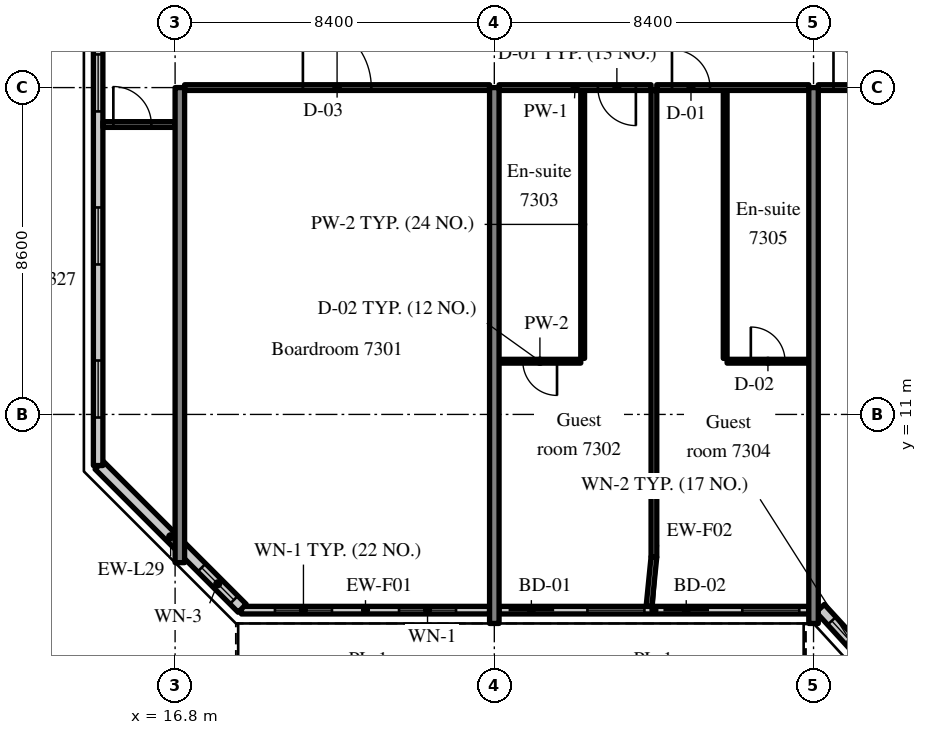
"""IFC4 building model, lengths in metres.
Left out: names, types, materials, properties, quantities, classifications, styles, units other than length and angle.
Written with IfcOpenShell. Run it as: python <this file> out.ifc"""

import sys

from ifc_helpers import new_model, si_unit, direction, frame, frame_2d, origin, place, context, subcontext, project, spatial, rectangle, extrude, source, transform, mapped, element, fill, save


model = new_model("IFC4")
c1 = context("Model", 3, precision=1e-05, world=origin(), true_north=direction((0.0, 1.0)))
c2 = subcontext(c1, "Body", "Model", "MODEL_VIEW")
j1 = project(units=[si_unit("LENGTHUNIT", "METRE"), si_unit("PLANEANGLEUNIT", "RADIAN")], contexts=[c1])
p1 = place(None, origin())
s1 = spatial("IfcSite", under=j1, at=p1, CompositionType="ELEMENT")
p2 = place(p1, origin())
s2 = spatial("IfcBuilding", under=s1, at=p2, CompositionType="ELEMENT")
p3 = place(p2, frame((0.0, 0.0, 305.7)))
s3 = spatial("IfcBuildingStorey", under=s2, at=p3, CompositionType="ELEMENT", Elevation=305.7)
m1 = source(origin(), c2, "Body", "SweptSolid", [
    extrude(rectangle(XDim=12.5, YDim=0.25, at=frame_2d((6.25, 0.0))), origin(), (0.0, 0.0, 1.0), 3.72),
])
p4 = place(p3, frame((16.925, 7.1, 0.0), z_axis=(0.0, 0.0, 1.0), x_axis=(0.0, 1.0, 0.0)))
e1 = element("IfcWall", 1, at=p4, inside=s3, PredefinedType="SHEAR", context=c2, shape_type="MappedRepresentation", body=[
    mapped(m1, transform((0.0, 0.0, 0.0), scale=1.0)),
])
m2 = source(origin(), c2, "Body", "SweptSolid", [
    extrude(rectangle(XDim=14.1, YDim=0.25, at=frame_2d((7.05, 0.0))), origin(), (0.0, 0.0, 1.0), 3.72),
])
for number, where, z_axis, x_axis in (
    (2, (25.2, 5.5, 0.0), (0.0, 0.0, 1.0), (0.0, 1.0, 0.0)),
    (3, (33.6, 5.5, 0.0), (0.0, 0.0, 1.0), (0.0, 1.0, 0.0)),
):
    element("IfcWall", number, at=place(p3, frame(where, z_axis=z_axis, x_axis=x_axis)), inside=s3, PredefinedType="SHEAR", context=c2, shape_type="MappedRepresentation", body=[
        mapped(m2, transform((0.0, 0.0, 0.0), scale=1.0)),
    ])
m3 = source(origin(), c2, "Body", "SweptSolid", [
    extrude(rectangle(XDim=6.53, YDim=0.2, at=frame_2d((3.265, 0.0))), origin(), (0.0, 0.0, 1.0), 3.17),
])
p5 = place(p3, frame((18.545, 5.85, 0.0), z_axis=(0.0, 0.0, 1.0), x_axis=(1.0, 0.0, 0.0)))
e4 = element("IfcWall", 4, at=p5, inside=s3, PredefinedType="SOLIDWALL", context=c2, shape_type="MappedRepresentation", body=[
    mapped(m3, transform((0.0, 0.0, 0.0), scale=1.0)),
])
m4 = source(origin(), c2, "Body", "SweptSolid", [
    extrude(rectangle(XDim=1.5, YDim=1.5, at=frame_2d((0.75, 0.75))), frame((0.0, 0.11, 0.0), z_axis=(0.0, -1.0, 0.0), x_axis=(1.0, 0.0, 0.0)), (0.0, 0.0, 1.0), 0.22),
])
p6 = place(p5, frame((0.883, 0.0, 0.9)))
e5 = element("IfcOpeningElement", 5, at=p6, cuts=e4, PredefinedType="OPENING", context=c2, shape_type="MappedRepresentation", body=[
    mapped(m4, transform((0.0, 0.0, 0.0), scale=1.0)),
])
p7 = place(p5, frame((4.147, 0.0, 0.9)))
e6 = element("IfcOpeningElement", 6, at=p7, cuts=e4, PredefinedType="OPENING", context=c2, shape_type="MappedRepresentation", body=[
    mapped(m4, transform((0.0, 0.0, 0.0), scale=1.0)),
])
m5 = source(origin(), c2, "Body", "SweptSolid", [
    extrude(rectangle(XDim=8.15, YDim=0.2, at=frame_2d((4.075, 0.0))), origin(), (0.0, 0.0, 1.0), 3.17),
])
p8 = place(p3, frame((25.325, 5.85, 0.0), z_axis=(0.0, 0.0, 1.0), x_axis=(1.0, 0.0, 0.0)))
e7 = element("IfcWall", 7, at=p8, inside=s3, PredefinedType="SOLIDWALL", context=c2, shape_type="MappedRepresentation", body=[
    mapped(m5, transform((0.0, 0.0, 0.0), scale=1.0)),
])
m6 = source(origin(), c2, "Body", "SweptSolid", [
    extrude(rectangle(XDim=1.2, YDim=2.4, at=frame_2d((0.6, 1.2))), frame((0.0, 0.11, 0.0), z_axis=(0.0, -1.0, 0.0), x_axis=(1.0, 0.0, 0.0)), (0.0, 0.0, 1.0), 0.22),
])
p9 = place(p8, frame((0.25, 0.0, 0.0)))
e8 = element("IfcOpeningElement", 8, at=p9, cuts=e7, PredefinedType="OPENING", context=c2, shape_type="MappedRepresentation", body=[
    mapped(m6, transform((0.0, 0.0, 0.0), scale=1.0)),
])
p10 = place(p8, frame((2.325, 0.0, 0.9)))
e9 = element("IfcOpeningElement", 9, at=p10, cuts=e7, PredefinedType="OPENING", context=c2, shape_type="MappedRepresentation", body=[
    mapped(m4, transform((0.0, 0.0, 0.0), scale=1.0)),
])
p11 = place(p8, frame((4.325, 0.0, 0.0)))
e10 = element("IfcOpeningElement", 10, at=p11, cuts=e7, PredefinedType="OPENING", context=c2, shape_type="MappedRepresentation", body=[
    mapped(m6, transform((0.0, 0.0, 0.0), scale=1.0)),
])
p12 = place(p8, frame((6.4, 0.0, 0.9)))
e11 = element("IfcOpeningElement", 11, at=p12, cuts=e7, PredefinedType="OPENING", context=c2, shape_type="MappedRepresentation", body=[
    mapped(m4, transform((0.0, 0.0, 0.0), scale=1.0)),
])
m7 = source(origin(), c2, "Body", "SweptSolid", [
    extrude(rectangle(XDim=2.398, YDim=0.3, at=frame_2d((1.199, 0.0))), origin(), (0.0, 0.0, 1.0), 3.72),
])
p13 = place(p3, frame((33.776, 5.9, 0.0), z_axis=(0.0, 0.0, 1.0), x_axis=(0.675374189419, -0.737475222815, 0.0)))
e12 = element("IfcWall", 12, at=p13, inside=s3, PredefinedType="SOLIDWALL", context=c2, shape_type="MappedRepresentation", body=[
    mapped(m7, transform((0.0, 0.0, 0.0), scale=1.0)),
])
m8 = source(origin(), c2, "Body", "SweptSolid", [
    extrude(rectangle(XDim=1.5, YDim=2.0, at=frame_2d((0.75, 1.0))), frame((0.0, 0.16, 0.0), z_axis=(0.0, -1.0, 0.0), x_axis=(1.0, 0.0, 0.0)), (0.0, 0.0, 1.0), 0.32),
])
p14 = place(p13, frame((0.449, 0.0, 0.9)))
e13 = element("IfcOpeningElement", 13, at=p14, cuts=e12, PredefinedType="OPENING", context=c2, shape_type="MappedRepresentation", body=[
    mapped(m8, transform((0.0, 0.0, 0.0), scale=1.0)),
])
m9 = source(origin(), c2, "Body", "SweptSolid", [
    extrude(rectangle(XDim=5.326, YDim=0.3, at=frame_2d((2.663, 0.0))), origin(), (0.0, 0.0, 1.0), 3.72),
])
p15 = place(p3, frame((14.8, 9.666, 0.0), z_axis=(0.0, 0.0, 1.0), x_axis=(0.707083859269, -0.707129702361, 0.0)))
e14 = element("IfcWall", 14, at=p15, inside=s3, PredefinedType="SOLIDWALL", context=c2, shape_type="MappedRepresentation", body=[
    mapped(m9, transform((0.0, 0.0, 0.0), scale=1.0)),
])
m10 = source(origin(), c2, "Body", "SweptSolid", [
    extrude(rectangle(XDim=1.2, YDim=1.5, at=frame_2d((0.6, 0.75))), frame((0.0, 0.16, 0.0), z_axis=(0.0, -1.0, 0.0), x_axis=(1.0, 0.0, 0.0)), (0.0, 0.0, 1.0), 0.32),
])
p16 = place(p15, frame((3.815, 0.0, 0.9)))
e15 = element("IfcOpeningElement", 15, at=p16, cuts=e14, PredefinedType="OPENING", context=c2, shape_type="MappedRepresentation", body=[
    mapped(m10, transform((0.0, 0.0, 0.0), scale=1.0)),
])
m11 = source(origin(), c2, "Body", "SweptSolid", [
    extrude(rectangle(XDim=28.189, YDim=0.25, at=frame_2d((14.095, 0.0))), origin(), (0.0, 0.0, 1.0), 3.72),
])
p17 = place(p3, frame((14.775, 37.845, 0.0), z_axis=(0.0, 0.0, 1.0), x_axis=(0.0, -1.0, 0.0)))
e16 = element("IfcWall", 16, at=p17, inside=s3, PredefinedType="SOLIDWALL", context=c2, shape_type="MappedRepresentation", body=[
    mapped(m11, transform((0.0, 0.0, 0.0), scale=1.0)),
])
m12 = source(origin(), c2, "Body", "SweptSolid", [
    extrude(rectangle(XDim=1.5, YDim=1.5, at=frame_2d((0.75, 0.75))), frame((0.0, 0.135, 0.0), z_axis=(0.0, -1.0, 0.0), x_axis=(1.0, 0.0, 0.0)), (0.0, 0.0, 1.0), 0.27),
])
p18 = place(p17, frame((1.263, 0.0, 0.9)))
e17 = element("IfcOpeningElement", 17, at=p18, cuts=e16, PredefinedType="OPENING", context=c2, shape_type="MappedRepresentation", body=[
    mapped(m12, transform((0.0, 0.0, 0.0), scale=1.0)),
])
p19 = place(p17, frame((5.291, 0.0, 0.9)))
e18 = element("IfcOpeningElement", 18, at=p19, cuts=e16, PredefinedType="OPENING", context=c2, shape_type="MappedRepresentation", body=[
    mapped(m12, transform((0.0, 0.0, 0.0), scale=1.0)),
])
p20 = place(p17, frame((9.318, 0.0, 0.9)))
e19 = element("IfcOpeningElement", 19, at=p20, cuts=e16, PredefinedType="OPENING", context=c2, shape_type="MappedRepresentation", body=[
    mapped(m12, transform((0.0, 0.0, 0.0), scale=1.0)),
])
p21 = place(p17, frame((13.345, 0.0, 0.9)))
e20 = element("IfcOpeningElement", 20, at=p21, cuts=e16, PredefinedType="OPENING", context=c2, shape_type="MappedRepresentation", body=[
    mapped(m12, transform((0.0, 0.0, 0.0), scale=1.0)),
])
p22 = place(p17, frame((17.372, 0.0, 0.9)))
e21 = element("IfcOpeningElement", 21, at=p22, cuts=e16, PredefinedType="OPENING", context=c2, shape_type="MappedRepresentation", body=[
    mapped(m12, transform((0.0, 0.0, 0.0), scale=1.0)),
])
p23 = place(p17, frame((21.399, 0.0, 0.9)))
e22 = element("IfcOpeningElement", 22, at=p23, cuts=e16, PredefinedType="OPENING", context=c2, shape_type="MappedRepresentation", body=[
    mapped(m12, transform((0.0, 0.0, 0.0), scale=1.0)),
])
p24 = place(p17, frame((25.426, 0.0, 0.9)))
e23 = element("IfcOpeningElement", 23, at=p24, cuts=e16, PredefinedType="OPENING", context=c2, shape_type="MappedRepresentation", body=[
    mapped(m12, transform((0.0, 0.0, 0.0), scale=1.0)),
])
m13 = source(origin(), c2, "Body", "SweptSolid", [
    extrude(rectangle(XDim=8.025, YDim=0.15, at=frame_2d((4.012, 0.0))), origin(), (0.0, 0.0, 1.0), 3.02),
])
p25 = place(p3, frame((17.05, 19.6, 0.0), z_axis=(0.0, 0.0, 1.0), x_axis=(1.0, 0.0, 0.0)))
e24 = element("IfcWall", 24, at=p25, inside=s3, PredefinedType="PARTITIONING", context=c2, shape_type="MappedRepresentation", body=[
    mapped(m13, transform((0.0, 0.0, 0.0), scale=1.0)),
])
m14 = source(origin(), c2, "Body", "SweptSolid", [
    extrude(rectangle(XDim=1.8, YDim=2.1, at=frame_2d((0.9, 1.05))), frame((0.0, 0.085, 0.0), z_axis=(0.0, -1.0, 0.0), x_axis=(1.0, 0.0, 0.0)), (0.0, 0.0, 1.0), 0.17),
])
p26 = place(p25, frame((3.113, 0.0, 0.0)))
e25 = element("IfcOpeningElement", 25, at=p26, cuts=e24, PredefinedType="OPENING", context=c2, shape_type="MappedRepresentation", body=[
    mapped(m14, transform((0.0, 0.0, 0.0), scale=1.0)),
])
m15 = source(origin(), c2, "Body", "SweptSolid", [
    extrude(rectangle(XDim=7.05, YDim=0.1, at=frame_2d((3.525, 0.0))), origin(), (0.0, 0.0, 1.0), 3.72),
])
p27 = place(p3, frame((27.525, 12.475, 0.0), z_axis=(0.0, 0.0, 1.0), x_axis=(0.0, 1.0, 0.0)))
e26 = element("IfcWall", 26, at=p27, inside=s3, PredefinedType="PARTITIONING", context=c2, shape_type="MappedRepresentation", body=[
    mapped(m15, transform((0.0, 0.0, 0.0), scale=1.0)),
])
m16 = source(origin(), c2, "Body", "SweptSolid", [
    extrude(rectangle(XDim=2.15, YDim=0.1, at=frame_2d((1.075, 0.0))), origin(), (0.0, 0.0, 1.0), 3.72),
])
p28 = place(p3, frame((25.325, 12.4, 0.0), z_axis=(0.0, 0.0, 1.0), x_axis=(1.0, 0.0, 0.0)))
e27 = element("IfcWall", 27, at=p28, inside=s3, PredefinedType="PARTITIONING", context=c2, shape_type="MappedRepresentation", body=[
    mapped(m16, transform((0.0, 0.0, 0.0), scale=1.0)),
])
m17 = source(origin(), c2, "Body", "SweptSolid", [
    extrude(rectangle(XDim=0.9, YDim=2.1, at=frame_2d((0.45, 1.05))), frame((0.0, 0.06, 0.0), z_axis=(0.0, -1.0, 0.0), x_axis=(1.0, 0.0, 0.0)), (0.0, 0.0, 1.0), 0.12),
])
p29 = place(p28, frame((0.625, 0.0, 0.0)))
e28 = element("IfcOpeningElement", 28, at=p29, cuts=e27, PredefinedType="OPENING", context=c2, shape_type="MappedRepresentation", body=[
    mapped(m17, transform((0.0, 0.0, 0.0), scale=1.0)),
])
m18 = source(origin(), c2, "Body", "SweptSolid", [
    extrude(rectangle(XDim=4.0, YDim=0.15, at=frame_2d((2.0, 0.0))), origin(), (0.0, 0.0, 1.0), 3.02),
])
p30 = place(p3, frame((25.325, 19.6, 0.0), z_axis=(0.0, 0.0, 1.0), x_axis=(1.0, 0.0, 0.0)))
e29 = element("IfcWall", 29, at=p30, inside=s3, PredefinedType="PARTITIONING", context=c2, shape_type="MappedRepresentation", body=[
    mapped(m18, transform((0.0, 0.0, 0.0), scale=1.0)),
])
m19 = source(origin(), c2, "Body", "SweptSolid", [
    extrude(rectangle(XDim=1.0, YDim=2.1, at=frame_2d((0.5, 1.05))), frame((0.0, 0.085, 0.0), z_axis=(0.0, -1.0, 0.0), x_axis=(1.0, 0.0, 0.0)), (0.0, 0.0, 1.0), 0.17),
])
p31 = place(p30, frame((2.6, 0.0, 0.0)))
e30 = element("IfcOpeningElement", 30, at=p31, cuts=e29, PredefinedType="OPENING", context=c2, shape_type="MappedRepresentation", body=[
    mapped(m19, transform((0.0, 0.0, 0.0), scale=1.0)),
])
p32 = place(p3, frame((31.275, 12.475, 0.0), z_axis=(0.0, 0.0, 1.0), x_axis=(0.0, 1.0, 0.0)))
e31 = element("IfcWall", 31, at=p32, inside=s3, PredefinedType="PARTITIONING", context=c2, shape_type="MappedRepresentation", body=[
    mapped(m15, transform((0.0, 0.0, 0.0), scale=1.0)),
])
p33 = place(p3, frame((31.325, 12.4, 0.0), z_axis=(0.0, 0.0, 1.0), x_axis=(1.0, 0.0, 0.0)))
e32 = element("IfcWall", 32, at=p33, inside=s3, PredefinedType="PARTITIONING", context=c2, shape_type="MappedRepresentation", body=[
    mapped(m16, transform((0.0, 0.0, 0.0), scale=1.0)),
])
p34 = place(p33, frame((0.625, 0.0, 0.0)))
e33 = element("IfcOpeningElement", 33, at=p34, cuts=e32, PredefinedType="OPENING", context=c2, shape_type="MappedRepresentation", body=[
    mapped(m17, transform((0.0, 0.0, 0.0), scale=1.0)),
])
p35 = place(p3, frame((29.475, 19.6, 0.0), z_axis=(0.0, 0.0, 1.0), x_axis=(1.0, 0.0, 0.0)))
e34 = element("IfcWall", 34, at=p35, inside=s3, PredefinedType="PARTITIONING", context=c2, shape_type="MappedRepresentation", body=[
    mapped(m18, transform((0.0, 0.0, 0.0), scale=1.0)),
])
p36 = place(p35, frame((0.4, 0.0, 0.0)))
e35 = element("IfcOpeningElement", 35, at=p36, cuts=e34, PredefinedType="OPENING", context=c2, shape_type="MappedRepresentation", body=[
    mapped(m19, transform((0.0, 0.0, 0.0), scale=1.0)),
])
m20 = source(origin(), c2, "Body", "SweptSolid", [
    extrude(rectangle(XDim=12.275, YDim=0.15, at=frame_2d((6.137, 0.0))), origin(), (0.0, 0.0, 1.0), 3.72),
])
p37 = place(p3, frame((29.4, 7.25, 0.0), z_axis=(0.0, 0.0, 1.0), x_axis=(0.0, 1.0, 0.0)))
e36 = element("IfcWall", 36, at=p37, inside=s3, PredefinedType="PARTITIONING", context=c2, shape_type="MappedRepresentation", body=[
    mapped(m20, transform((0.0, 0.0, 0.0), scale=1.0)),
])
m21 = source(origin(), c2, "Body", "SweptSolid", [
    extrude(rectangle(XDim=8.15, YDim=0.15, at=frame_2d((4.075, 0.0))), origin(), (0.0, 0.0, 1.0), 3.02),
])
p38 = place(p3, frame((33.725, 19.6, 0.0), z_axis=(0.0, 0.0, 1.0), x_axis=(1.0, 0.0, 0.0)))
e37 = element("IfcWall", 37, at=p38, inside=s3, PredefinedType="PARTITIONING", context=c2, shape_type="MappedRepresentation", body=[
    mapped(m21, transform((0.0, 0.0, 0.0), scale=1.0)),
])
p39 = place(p38, frame((0.4, 0.0, 0.0)))
e38 = element("IfcOpeningElement", 38, at=p39, cuts=e37, PredefinedType="OPENING", context=c2, shape_type="MappedRepresentation", body=[
    mapped(m19, transform((0.0, 0.0, 0.0), scale=1.0)),
])
m22 = source(origin(), c2, "Body", "SweptSolid", [
    extrude(rectangle(XDim=1.9, YDim=0.15, at=frame_2d((0.95, 0.0))), origin(), (0.0, 0.0, 1.0), 3.02),
])
p40 = place(p3, frame((14.9, 18.628, 0.0), z_axis=(0.0, 0.0, 1.0), x_axis=(1.0, 0.0, 0.0)))
e39 = element("IfcWall", 39, at=p40, inside=s3, PredefinedType="PARTITIONING", context=c2, shape_type="MappedRepresentation", body=[
    mapped(m22, transform((0.0, 0.0, 0.0), scale=1.0)),
])
p41 = place(p40, frame((0.275, 0.0, 0.0)))
e40 = element("IfcOpeningElement", 40, at=p41, cuts=e39, PredefinedType="OPENING", context=c2, shape_type="MappedRepresentation", body=[
    mapped(m19, transform((0.0, 0.0, 0.0), scale=1.0)),
])
m23 = source(origin(), c2, "Body", "SweptSolid", [
    extrude(rectangle(XDim=1.307, YDim=0.15, at=frame_2d((0.653, 0.0))), origin(), (0.0, 0.0, 1.0), 3.72),
])
p42 = place(p3, frame((29.27, 5.95, 0.0), z_axis=(0.0, 0.0, 1.0), x_axis=(0.099411212066, 0.995046436562, 0.0)))
e41 = element("IfcWall", 41, at=p42, inside=s3, PredefinedType="PARTITIONING", context=c2, shape_type="MappedRepresentation", body=[
    mapped(m23, transform((0.0, 0.0, 0.0), scale=1.0)),
])
m24 = source(origin(), c2, "Body", "SweptSolid", [
    extrude(rectangle(XDim=1.5, YDim=1.5, at=frame_2d((0.75, 0.75))), frame((0.0, 0.03, 0.0), z_axis=(0.0, -1.0, 0.0), x_axis=(1.0, 0.0, 0.0)), (0.0, 0.0, 1.0), 0.06),
])
p43 = place(p6, origin())
e42 = element("IfcWindow", 42, at=p43, inside=s3, PartitioningType="SINGLE_PANEL", PredefinedType="WINDOW", context=c2, shape_type="MappedRepresentation", body=[
    mapped(m24, transform((0.0, 0.0, 0.0), scale=1.0)),
])
fill(e5, e42)
p44 = place(p7, origin())
e43 = element("IfcWindow", 43, at=p44, inside=s3, PartitioningType="SINGLE_PANEL", PredefinedType="WINDOW", context=c2, shape_type="MappedRepresentation", body=[
    mapped(m24, transform((0.0, 0.0, 0.0), scale=1.0)),
])
fill(e6, e43)
m25 = source(origin(), c2, "Body", "SweptSolid", [
    extrude(rectangle(XDim=1.2, YDim=2.4, at=frame_2d((0.6, 1.2))), frame((0.0, 0.025, 0.0), z_axis=(0.0, -1.0, 0.0), x_axis=(1.0, 0.0, 0.0)), (0.0, 0.0, 1.0), 0.05),
])
p45 = place(p9, origin())
e44 = element("IfcDoor", 44, at=p45, inside=s3, OperationType="SLIDING_TO_LEFT", PredefinedType="DOOR", context=c2, shape_type="MappedRepresentation", body=[
    mapped(m25, transform((0.0, 0.0, 0.0), scale=1.0)),
])
fill(e8, e44)
p46 = place(p10, origin())
e45 = element("IfcWindow", 45, at=p46, inside=s3, PartitioningType="SINGLE_PANEL", PredefinedType="WINDOW", context=c2, shape_type="MappedRepresentation", body=[
    mapped(m24, transform((0.0, 0.0, 0.0), scale=1.0)),
])
fill(e9, e45)
p47 = place(p11, origin())
e46 = element("IfcDoor", 46, at=p47, inside=s3, OperationType="SLIDING_TO_RIGHT", PredefinedType="DOOR", context=c2, shape_type="MappedRepresentation", body=[
    mapped(m25, transform((0.0, 0.0, 0.0), scale=1.0)),
])
fill(e10, e46)
p48 = place(p12, origin())
e47 = element("IfcWindow", 47, at=p48, inside=s3, PartitioningType="SINGLE_PANEL", PredefinedType="WINDOW", context=c2, shape_type="MappedRepresentation", body=[
    mapped(m24, transform((0.0, 0.0, 0.0), scale=1.0)),
])
fill(e11, e47)
m26 = source(origin(), c2, "Body", "SweptSolid", [
    extrude(rectangle(XDim=1.5, YDim=2.0, at=frame_2d((0.75, 1.0))), frame((0.0, 0.03, 0.0), z_axis=(0.0, -1.0, 0.0), x_axis=(1.0, 0.0, 0.0)), (0.0, 0.0, 1.0), 0.06),
])
p49 = place(p14, origin())
e48 = element("IfcWindow", 48, at=p49, inside=s3, PartitioningType="SINGLE_PANEL", PredefinedType="WINDOW", context=c2, shape_type="MappedRepresentation", body=[
    mapped(m26, transform((0.0, 0.0, 0.0), scale=1.0)),
])
fill(e13, e48)
m27 = source(origin(), c2, "Body", "SweptSolid", [
    extrude(rectangle(XDim=1.2, YDim=1.5, at=frame_2d((0.6, 0.75))), frame((0.0, 0.03, 0.0), z_axis=(0.0, -1.0, 0.0), x_axis=(1.0, 0.0, 0.0)), (0.0, 0.0, 1.0), 0.06),
])
p50 = place(p16, origin())
e49 = element("IfcWindow", 49, at=p50, inside=s3, PartitioningType="SINGLE_PANEL", PredefinedType="WINDOW", context=c2, shape_type="MappedRepresentation", body=[
    mapped(m27, transform((0.0, 0.0, 0.0), scale=1.0)),
])
fill(e15, e49)
p51 = place(p22, origin())
e50 = element("IfcWindow", 50, at=p51, inside=s3, PartitioningType="SINGLE_PANEL", PredefinedType="WINDOW", context=c2, shape_type="MappedRepresentation", body=[
    mapped(m24, transform((0.0, 0.0, 0.0), scale=1.0)),
])
fill(e21, e50)
p52 = place(p23, origin())
e51 = element("IfcWindow", 51, at=p52, inside=s3, PartitioningType="SINGLE_PANEL", PredefinedType="WINDOW", context=c2, shape_type="MappedRepresentation", body=[
    mapped(m24, transform((0.0, 0.0, 0.0), scale=1.0)),
])
fill(e22, e51)
p53 = place(p24, origin())
e52 = element("IfcWindow", 52, at=p53, inside=s3, PartitioningType="SINGLE_PANEL", PredefinedType="WINDOW", context=c2, shape_type="MappedRepresentation", body=[
    mapped(m24, transform((0.0, 0.0, 0.0), scale=1.0)),
])
fill(e23, e52)
m28 = source(origin(), c2, "Body", "SweptSolid", [
    extrude(rectangle(XDim=1.8, YDim=2.1, at=frame_2d((0.9, 1.05))), frame((0.0, 0.025, 0.0), z_axis=(0.0, -1.0, 0.0), x_axis=(1.0, 0.0, 0.0)), (0.0, 0.0, 1.0), 0.05),
])
p54 = place(p26, origin())
e53 = element("IfcDoor", 53, at=p54, inside=s3, OperationType="DOUBLE_DOOR_SINGLE_SWING", PredefinedType="DOOR", context=c2, shape_type="MappedRepresentation", body=[
    mapped(m28, transform((0.0, 0.0, 0.0), scale=1.0)),
])
fill(e25, e53)
m29 = source(origin(), c2, "Body", "SweptSolid", [
    extrude(rectangle(XDim=0.9, YDim=2.1, at=frame_2d((0.45, 1.05))), frame((0.0, 0.025, 0.0), z_axis=(0.0, -1.0, 0.0), x_axis=(1.0, 0.0, 0.0)), (0.0, 0.0, 1.0), 0.05),
])
p55 = place(p29, origin())
e54 = element("IfcDoor", 54, at=p55, inside=s3, OperationType="SINGLE_SWING_RIGHT", PredefinedType="DOOR", context=c2, shape_type="MappedRepresentation", body=[
    mapped(m29, transform((0.0, 0.0, 0.0), scale=1.0)),
])
fill(e28, e54)
m30 = source(origin(), c2, "Body", "SweptSolid", [
    extrude(rectangle(XDim=1.0, YDim=2.1, at=frame_2d((0.5, 1.05))), frame((0.0, 0.025, 0.0), z_axis=(0.0, -1.0, 0.0), x_axis=(1.0, 0.0, 0.0)), (0.0, 0.0, 1.0), 0.05),
])
p56 = place(p31, origin())
e55 = element("IfcDoor", 55, at=p56, inside=s3, OperationType="SINGLE_SWING_RIGHT", PredefinedType="DOOR", context=c2, shape_type="MappedRepresentation", body=[
    mapped(m30, transform((0.0, 0.0, 0.0), scale=1.0)),
])
fill(e30, e55)
p57 = place(p34, origin())
e56 = element("IfcDoor", 56, at=p57, inside=s3, OperationType="SINGLE_SWING_LEFT", PredefinedType="DOOR", context=c2, shape_type="MappedRepresentation", body=[
    mapped(m29, transform((0.0, 0.0, 0.0), scale=1.0)),
])
fill(e33, e56)
p58 = place(p36, origin())
e57 = element("IfcDoor", 57, at=p58, inside=s3, OperationType="SINGLE_SWING_LEFT", PredefinedType="DOOR", context=c2, shape_type="MappedRepresentation", body=[
    mapped(m30, transform((0.0, 0.0, 0.0), scale=1.0)),
])
fill(e35, e57)
p59 = place(p39, origin())
e58 = element("IfcDoor", 58, at=p59, inside=s3, OperationType="SINGLE_SWING_LEFT", PredefinedType="DOOR", context=c2, shape_type="MappedRepresentation", body=[
    mapped(m30, transform((0.0, 0.0, 0.0), scale=1.0)),
])
fill(e38, e58)
p60 = place(p41, origin())
e59 = element("IfcDoor", 59, at=p60, inside=s3, OperationType="SINGLE_SWING_LEFT", PredefinedType="DOOR", context=c2, shape_type="MappedRepresentation", body=[
    mapped(m30, transform((0.0, 0.0, 0.0), scale=1.0)),
])
fill(e40, e59)
save(model, sys.argv[1])
